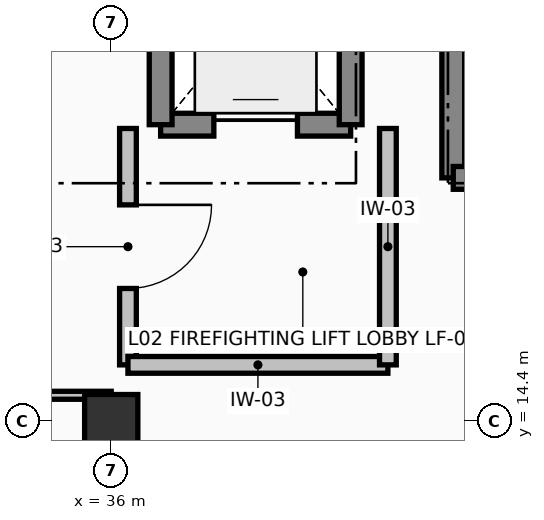
"""IFC4 building model, lengths in metres.
Left out: names, types, materials, properties, quantities, classifications, styles, units other than length and angle.
Written with IfcOpenShell. Run it as: python <this file> out.ifc"""

import sys

from ifc_helpers import new_model, si_unit, direction, frame, frame_2d, origin, origin_2d, place, context, subcontext, project, spatial, rectangle, extrude, element, fill, save


model = new_model("IFC4")
c1 = context("Model", 3, precision=1e-05, world=origin(), true_north=direction((0.0, 1.0)))
c2 = subcontext(c1, "Body", "Model", "MODEL_VIEW")
j1 = project(units=[si_unit("LENGTHUNIT", "METRE"), si_unit("PLANEANGLEUNIT", "RADIAN")], contexts=[c1])
p1 = place(None, origin())
s1 = spatial("IfcSite", under=j1, at=p1, CompositionType="ELEMENT")
p2 = place(p1, origin())
s2 = spatial("IfcBuilding", under=s1, at=p2, CompositionType="ELEMENT")
p3 = place(p2, frame((0.0, 0.0, 9.84)))
s3 = spatial("IfcBuildingStorey", under=s2, at=p3, CompositionType="ELEMENT", Elevation=9.84)
p4 = place(p3, frame((36.0, 14.4, 0.0), z_axis=(0.0, 0.0, 1.0), x_axis=(1.0, 0.0, 0.0)))
e1 = element("IfcColumn", 1, at=p4, inside=s3, PredefinedType="COLUMN", context=c2, shape_type="SweptSolid", body=[
    extrude(rectangle(XDim=0.7, YDim=0.7, at=origin_2d()), origin(), (0.0, 0.0, 1.0), 3.74),
])
p5 = place(p3, frame((40.5, 17.6, 0.0), z_axis=(0.0, 0.0, 1.0), x_axis=(0.0, 1.0, 0.0)))
e2 = element("IfcWall", 2, at=p5, inside=s3, PredefinedType="SHEAR", context=c2, shape_type="SweptSolid", body=[
    extrude(rectangle(XDim=3.8, YDim=0.3, at=frame_2d((1.9, 0.0))), origin(), (0.0, 0.0, 1.0), 3.74),
])
p6 = place(p3, frame((40.5, 17.6, 0.0), z_axis=(0.0, 0.0, 1.0), x_axis=(1.0, 0.0, 0.0)))
e3 = element("IfcWall", 3, at=p6, inside=s3, PredefinedType="SHEAR", context=c2, shape_type="SweptSolid", body=[
    extrude(rectangle(XDim=9.0, YDim=0.3, at=frame_2d((4.5, 0.0))), origin(), (0.0, 0.0, 1.0), 3.74),
])
p7 = place(p6, frame((0.35, 0.0, 0.0)))
e4 = element("IfcOpeningElement", 4, at=p7, cuts=e3, PredefinedType="OPENING", context=c2, shape_type="SweptSolid", body=[
    extrude(rectangle(XDim=1.15, YDim=2.15, at=frame_2d((0.575, 1.075))), frame((0.0, 0.16, 0.0), z_axis=(0.0, -1.0, 0.0), x_axis=(1.0, 0.0, 0.0)), (0.0, 0.0, 1.0), 0.32),
])
p8 = place(p3, frame((36.65, 18.3, 0.0), z_axis=(0.0, 0.0, 1.0), x_axis=(1.0, 0.0, 0.0)))
e5 = element("IfcWall", 5, at=p8, inside=s3, PredefinedType="SHEAR", context=c2, shape_type="SweptSolid", body=[
    extrude(rectangle(XDim=2.5, YDim=0.3, at=frame_2d((1.25, 0.0))), origin(), (0.0, 0.0, 1.0), 3.74),
])
p9 = place(p8, frame((0.7, 0.0, 0.0)))
e6 = element("IfcOpeningElement", 6, at=p9, cuts=e5, PredefinedType="OPENING", context=c2, shape_type="SweptSolid", body=[
    extrude(rectangle(XDim=1.1, YDim=2.1, at=frame_2d((0.55, 1.05))), frame((0.0, 0.16, 0.0), z_axis=(0.0, -1.0, 0.0), x_axis=(1.0, 0.0, 0.0)), (0.0, 0.0, 1.0), 0.32),
])
for number, where, z_axis, x_axis in (
    (7, (36.65, 18.3, 0.0), (0.0, 0.0, 1.0), (0.0, 1.0, 0.0)),
    (8, (39.15, 18.3, 0.0), (0.0, 0.0, 1.0), (0.0, 1.0, 0.0)),
):
    element("IfcWall", number, at=place(p3, frame(where, z_axis=z_axis, x_axis=x_axis)), inside=s3, PredefinedType="SHEAR", context=c2, shape_type="SweptSolid", body=[
        extrude(rectangle(XDim=3.0, YDim=0.3, at=frame_2d((1.5, 0.0))), origin(), (0.0, 0.0, 1.0), 3.74),
    ])
p10 = place(p3, frame((36.22, 18.25, 0.0), z_axis=(0.0, 0.0, 1.0), x_axis=(0.0, -1.0, 0.0)))
e9 = element("IfcWall", 9, at=p10, inside=s3, PredefinedType="SOLIDWALL", context=c2, shape_type="SweptSolid", body=[
    extrude(rectangle(XDim=3.11, YDim=0.22, at=frame_2d((1.555, 0.0))), origin(), (0.0, 0.0, 1.0), 2.72),
])
p11 = place(p10, frame((1.005, 0.0, 0.0)))
e10 = element("IfcOpeningElement", 10, at=p11, cuts=e9, PredefinedType="OPENING", context=c2, shape_type="SweptSolid", body=[
    extrude(rectangle(XDim=1.1, YDim=2.15, at=frame_2d((0.55, 1.075))), frame((0.0, 0.12, 0.0), z_axis=(0.0, -1.0, 0.0), x_axis=(1.0, 0.0, 0.0)), (0.0, 0.0, 1.0), 0.24),
])
p12 = place(p3, frame((36.22, 15.14, 0.0), z_axis=(0.0, 0.0, 1.0), x_axis=(1.0, 0.0, 0.0)))
e11 = element("IfcWall", 11, at=p12, inside=s3, PredefinedType="SOLIDWALL", context=c2, shape_type="SweptSolid", body=[
    extrude(rectangle(XDim=3.42, YDim=0.22, at=frame_2d((1.71, 0.0))), origin(), (0.0, 0.0, 1.0), 3.48),
])
p13 = place(p3, frame((39.64, 15.14, 0.0), z_axis=(0.0, 0.0, 1.0), x_axis=(0.0, 1.0, 0.0)))
e12 = element("IfcWall", 12, at=p13, inside=s3, PredefinedType="SOLIDWALL", context=c2, shape_type="SweptSolid", body=[
    extrude(rectangle(XDim=3.11, YDim=0.22, at=frame_2d((1.555, 0.0))), origin(), (0.0, 0.0, 1.0), 3.48),
])
p14 = place(p3, frame((36.0, 14.74, 0.0), z_axis=(0.0, 0.0, 1.0), x_axis=(-1.0, 0.0, 0.0)))
e13 = element("IfcWall", 13, at=p14, inside=s3, PredefinedType="PARTITIONING", context=c2, shape_type="SweptSolid", body=[
    extrude(rectangle(XDim=28.2, YDim=0.105, at=frame_2d((14.1, 0.0))), origin(), (0.0, 0.0, 1.0), 2.77),
])
p15 = place(p14, frame((13.61, 0.0, 0.0)))
e14 = element("IfcOpeningElement", 14, at=p15, cuts=e13, PredefinedType="OPENING", context=c2, shape_type="SweptSolid", body=[
    extrude(rectangle(XDim=0.98, YDim=2.12, at=frame_2d((0.49, 1.06))), frame((0.0, 0.062, 0.0), z_axis=(0.0, -1.0, 0.0), x_axis=(1.0, 0.0, 0.0)), (0.0, 0.0, 1.0), 0.125),
])
p16 = place(p3, frame((36.0, 0.22, 0.0), z_axis=(0.0, 0.0, 1.0), x_axis=(0.0, 1.0, 0.0)))
e15 = element("IfcWall", 15, at=p16, inside=s3, PredefinedType="PARTITIONING", context=c2, shape_type="SweptSolid", body=[
    extrude(rectangle(XDim=14.52, YDim=0.105, at=frame_2d((7.26, 0.0))), origin(), (0.0, 0.0, 1.0), 2.52),
])
p17 = place(p9, origin())
e16 = element("IfcDoor", 16, at=p17, inside=s3, OperationType="SLIDING_TO_LEFT", PredefinedType="DOOR", context=c2, shape_type="SweptSolid", body=[
    extrude(rectangle(XDim=1.1, YDim=2.1, at=frame_2d((0.55, 1.05))), frame((0.0, 0.025, 0.0), z_axis=(0.0, -1.0, 0.0), x_axis=(1.0, 0.0, 0.0)), (0.0, 0.0, 1.0), 0.05),
])
fill(e6, e16)
p18 = place(p11, origin())
e17 = element("IfcDoor", 17, at=p18, inside=s3, OperationType="SINGLE_SWING_LEFT", PredefinedType="DOOR", context=c2, shape_type="SweptSolid", body=[
    extrude(rectangle(XDim=1.1, YDim=2.15, at=frame_2d((0.55, 1.075))), frame((0.0, 0.025, 0.0), z_axis=(0.0, -1.0, 0.0), x_axis=(1.0, 0.0, 0.0)), (0.0, 0.0, 1.0), 0.05),
])
fill(e10, e17)
save(model, sys.argv[1])
